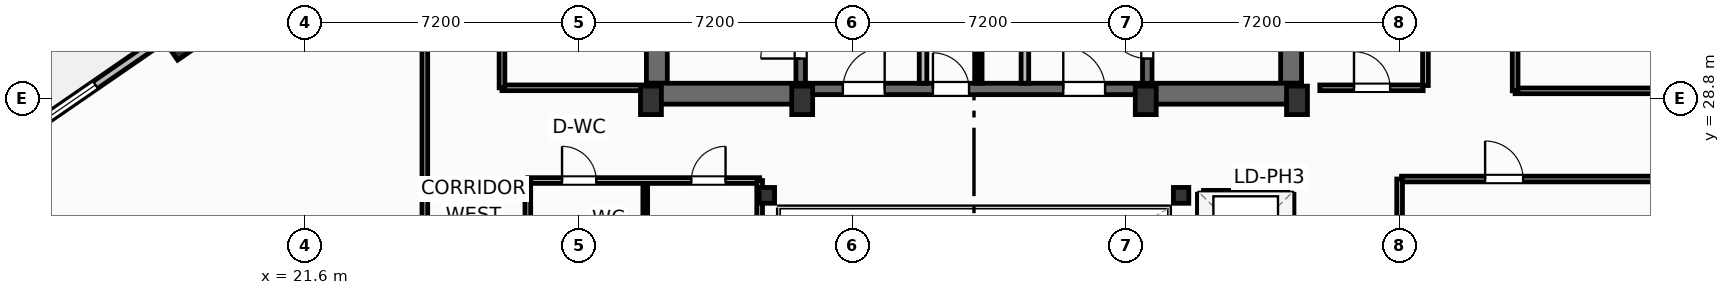
"""IFC4 building model, lengths in metres.
Left out: names, types, materials, properties, quantities, classifications, styles, units other than length and angle.
Written with IfcOpenShell. Run it as: python <this file> out.ifc"""

import sys

from ifc_helpers import new_model, si_unit, direction, frame, frame_2d, origin, origin_2d, place, context, subcontext, project, spatial, rectangle, i_section, extrude, element, fill, save


model = new_model("IFC4")
c1 = context("Model", 3, precision=1e-05, world=origin(), true_north=direction((0.0, 1.0)))
c2 = subcontext(c1, "Body", "Model", "MODEL_VIEW")
j1 = project(units=[si_unit("LENGTHUNIT", "METRE"), si_unit("PLANEANGLEUNIT", "RADIAN")], contexts=[c1])
p1 = place(None, origin())
s1 = spatial("IfcSite", under=j1, at=p1, CompositionType="ELEMENT")
p2 = place(p1, origin())
s2 = spatial("IfcBuilding", under=s1, at=p2, CompositionType="ELEMENT")
p3 = place(p2, frame((0.0, 0.0, 296.3)))
s3 = spatial("IfcBuildingStorey", under=s2, at=p3, CompositionType="ELEMENT", Elevation=296.3)
for number, where, z_axis, x_axis in (
    (1, (30.7, 28.75, 0.0), (0.0, 0.0, 1.0), (1.0, 0.0, 0.0)),
    (2, (34.68, 28.75, 0.0), (0.0, 0.0, 1.0), (1.0, 0.0, 0.0)),
    (3, (43.72, 28.75, 0.0), (0.0, 0.0, 1.0), (1.0, 0.0, 0.0)),
    (4, (47.7, 28.75, 0.0), (0.0, 0.0, 1.0), (1.0, 0.0, 0.0)),
):
    element("IfcColumn", number, at=place(p3, frame(where, z_axis=z_axis, x_axis=x_axis)), inside=s3, PredefinedType="COLUMN", context=c2, shape_type="SweptSolid", body=[
        extrude(rectangle(XDim=0.55, YDim=0.75, at=origin_2d()), origin(), (0.0, 0.0, 1.0), 4.8),
    ])
for number, where, z_axis, x_axis in (
    (5, (33.75, 26.25, 0.0), (0.0, 0.0, 1.0), (1.0, 0.0, 0.0)),
    (6, (44.65, 26.25, 0.0), (0.0, 0.0, 1.0), (1.0, 0.0, 0.0)),
):
    element("IfcColumn", number, at=place(p3, frame(where, z_axis=z_axis, x_axis=x_axis)), inside=s3, PredefinedType="COLUMN", context=c2, shape_type="SweptSolid", body=[
        extrude(i_section(OverallWidth=0.406, OverallDepth=0.416, WebThickness=0.03, FlangeThickness=0.048, FilletRadius=0.025, at=origin_2d()), origin(), (0.0, 0.0, 1.0), 4.8),
    ])
for number, where, z_axis, x_axis in (
    (7, (30.855, 29.2, 0.0), (0.0, 0.0, 1.0), (0.0, 1.0, 0.0)),
    (8, (47.545, 29.2, 0.0), (0.0, 0.0, 1.0), (0.0, 1.0, 0.0)),
):
    element("IfcWall", number, at=place(p3, frame(where, z_axis=z_axis, x_axis=x_axis)), inside=s3, PredefinedType="SHEAR", context=c2, shape_type="SweptSolid", body=[
        extrude(rectangle(XDim=9.22, YDim=0.55, at=frame_2d((4.61, 0.0))), origin(), (0.0, 0.0, 1.0), 4.55),
    ])
for number, where, z_axis, x_axis in (
    (9, (30.58, 28.925, 0.0), (0.0, 0.0, 1.0), (1.0, 0.0, 0.0)),
    (10, (43.6, 28.925, 0.0), (0.0, 0.0, 1.0), (1.0, 0.0, 0.0)),
):
    element("IfcWall", number, at=place(p3, frame(where, z_axis=z_axis, x_axis=x_axis)), inside=s3, PredefinedType="SHEAR", context=c2, shape_type="SweptSolid", body=[
        extrude(rectangle(XDim=4.22, YDim=0.55, at=frame_2d((2.11, 0.0))), origin(), (0.0, 0.0, 1.0), 4.55),
    ])
p4 = place(p3, frame((34.8, 29.05, 0.0), z_axis=(0.0, 0.0, 1.0), x_axis=(1.0, 0.0, 0.0)))
e11 = element("IfcWall", 11, at=p4, inside=s3, PredefinedType="SHEAR", context=c2, shape_type="SweptSolid", body=[
    extrude(rectangle(XDim=8.8, YDim=0.3, at=frame_2d((4.4, 0.0))), origin(), (0.0, 0.0, 1.0), 4.55),
])
p5 = place(p4, frame((0.95, 0.0, 0.0)))
e12 = element("IfcOpeningElement", 12, at=p5, cuts=e11, PredefinedType="OPENING", context=c2, shape_type="SweptSolid", body=[
    extrude(rectangle(XDim=1.1, YDim=2.15, at=frame_2d((0.55, 1.075))), frame((0.0, 0.16, 0.0), z_axis=(0.0, -1.0, 0.0), x_axis=(1.0, 0.0, 0.0)), (0.0, 0.0, 1.0), 0.32),
])
p6 = place(p4, frame((6.75, 0.0, 0.0)))
e13 = element("IfcOpeningElement", 13, at=p6, cuts=e11, PredefinedType="OPENING", context=c2, shape_type="SweptSolid", body=[
    extrude(rectangle(XDim=1.1, YDim=2.15, at=frame_2d((0.55, 1.075))), frame((0.0, 0.16, 0.0), z_axis=(0.0, -1.0, 0.0), x_axis=(1.0, 0.0, 0.0)), (0.0, 0.0, 1.0), 0.32),
])
p7 = place(p4, frame((3.32, 0.0, 0.0)))
e14 = element("IfcOpeningElement", 14, at=p7, cuts=e11, PredefinedType="OPENING", context=c2, shape_type="SweptSolid", body=[
    extrude(rectangle(XDim=0.95, YDim=2.15, at=frame_2d((0.475, 1.075))), frame((0.0, 0.16, 0.0), z_axis=(0.0, -1.0, 0.0), x_axis=(1.0, 0.0, 0.0)), (0.0, 0.0, 1.0), 0.32),
])
p8 = place(p3, frame((34.64, 29.2, 0.0), z_axis=(0.0, 0.0, 1.0), x_axis=(0.0, 1.0, 0.0)))
e15 = element("IfcWall", 15, at=p8, inside=s3, PredefinedType="SHEAR", context=c2, shape_type="SweptSolid", body=[
    extrude(rectangle(XDim=9.22, YDim=0.25, at=frame_2d((4.61, 0.0))), origin(), (0.0, 0.0, 1.0), 4.55),
])
p9 = place(p8, frame((0.65, 0.0, 0.0)))
e16 = element("IfcOpeningElement", 16, at=p9, cuts=e15, PredefinedType="OPENING", context=c2, shape_type="SweptSolid", body=[
    extrude(rectangle(XDim=1.05, YDim=2.15, at=frame_2d((0.525, 1.075))), frame((0.0, 0.135, 0.0), z_axis=(0.0, -1.0, 0.0), x_axis=(1.0, 0.0, 0.0)), (0.0, 0.0, 1.0), 0.27),
])
p10 = place(p3, frame((43.76, 29.2, 0.0), z_axis=(0.0, 0.0, 1.0), x_axis=(0.0, 1.0, 0.0)))
e17 = element("IfcWall", 17, at=p10, inside=s3, PredefinedType="SHEAR", context=c2, shape_type="SweptSolid", body=[
    extrude(rectangle(XDim=9.22, YDim=0.25, at=frame_2d((4.61, 0.0))), origin(), (0.0, 0.0, 1.0), 4.55),
])
p11 = place(p10, frame((0.65, 0.0, 0.0)))
e18 = element("IfcOpeningElement", 18, at=p11, cuts=e17, PredefinedType="OPENING", context=c2, shape_type="SweptSolid", body=[
    extrude(rectangle(XDim=1.05, YDim=2.15, at=frame_2d((0.525, 1.075))), frame((0.0, 0.135, 0.0), z_axis=(0.0, -1.0, 0.0), x_axis=(1.0, 0.0, 0.0)), (0.0, 0.0, 1.0), 0.27),
])
p12 = place(p3, frame((18.296, 30.086, -0.32), z_axis=(0.0, 0.0, 1.0), x_axis=(0.823532597628, 0.567268949127, 0.0)))
e19 = element("IfcColumn", 19, at=p12, inside=s3, PredefinedType="COLUMN", context=c2, shape_type="SweptSolid", body=[
    extrude(i_section(OverallWidth=0.401, OverallDepth=0.399, WebThickness=0.025, FlangeThickness=0.04, FilletRadius=0.022, at=origin_2d()), origin(), (0.0, 0.0, 1.0), 5.12),
])
p13 = place(p3, frame((13.489, 27.37, 0.0), z_axis=(0.0, 0.0, 1.0), x_axis=(0.823532439547, 0.567269178622, 0.0)))
e20 = element("IfcWall", 20, at=p13, inside=s3, PredefinedType="SOLIDWALL", context=c2, shape_type="SweptSolid", body=[
    extrude(rectangle(XDim=40.0, YDim=0.22, at=frame_2d((20.0, 0.0))), origin(), (0.0, 0.0, 1.0), 3.83),
])
p14 = place(p13, frame((25.598, 0.0, 0.0)))
e21 = element("IfcOpeningElement", 21, at=p14, cuts=e20, PredefinedType="OPENING", context=c2, shape_type="SweptSolid", body=[
    extrude(rectangle(XDim=1.95, YDim=2.35, at=frame_2d((0.975, 1.175))), frame((0.0, 0.12, 0.0), z_axis=(0.0, -1.0, 0.0), x_axis=(1.0, 0.0, 0.0)), (0.0, 0.0, 1.0), 0.24),
])
p15 = place(p13, frame((0.55, 0.0, 0.75)))
e22 = element("IfcOpeningElement", 22, at=p15, cuts=e20, PredefinedType="OPENING", context=c2, shape_type="SweptSolid", body=[
    extrude(rectangle(XDim=2.6, YDim=2.0, at=frame_2d((1.3, 1.0))), frame((0.0, 0.12, 0.0), z_axis=(0.0, -1.0, 0.0), x_axis=(1.0, 0.0, 0.0)), (0.0, 0.0, 1.0), 0.24),
])
p16 = place(p13, frame((36.85, 0.0, 0.75)))
e23 = element("IfcOpeningElement", 23, at=p16, cuts=e20, PredefinedType="OPENING", context=c2, shape_type="SweptSolid", body=[
    extrude(rectangle(XDim=2.6, YDim=2.0, at=frame_2d((1.3, 1.0))), frame((0.0, 0.12, 0.0), z_axis=(0.0, -1.0, 0.0), x_axis=(1.0, 0.0, 0.0)), (0.0, 0.0, 1.0), 0.24),
])
p17 = place(p3, frame((27.46, 26.64, 0.0), z_axis=(0.0, 0.0, 1.0), x_axis=(1.0, 0.0, 0.0)))
e24 = element("IfcWall", 24, at=p17, inside=s3, PredefinedType="PARTITIONING", context=c2, shape_type="SweptSolid", body=[
    extrude(rectangle(XDim=6.1, YDim=0.15, at=frame_2d((3.05, 0.0))), origin(), (0.0, 0.0, 1.0), 4.55),
])
p18 = place(p17, frame((0.9, 0.0, 0.0)))
e25 = element("IfcOpeningElement", 25, at=p18, cuts=e24, PredefinedType="OPENING", context=c2, shape_type="SweptSolid", body=[
    extrude(rectangle(XDim=0.9, YDim=2.05, at=frame_2d((0.45, 1.025))), frame((0.0, 0.085, 0.0), z_axis=(0.0, -1.0, 0.0), x_axis=(1.0, 0.0, 0.0)), (0.0, 0.0, 1.0), 0.17),
])
p19 = place(p17, frame((4.303, 0.0, 0.0)))
e26 = element("IfcOpeningElement", 26, at=p19, cuts=e24, PredefinedType="OPENING", context=c2, shape_type="SweptSolid", body=[
    extrude(rectangle(XDim=0.9, YDim=2.05, at=frame_2d((0.45, 1.025))), frame((0.0, 0.085, 0.0), z_axis=(0.0, -1.0, 0.0), x_axis=(1.0, 0.0, 0.0)), (0.0, 0.0, 1.0), 0.17),
])
p20 = place(p3, frame((30.55, 19.38, 0.0), z_axis=(0.0, 0.0, 1.0), x_axis=(0.0, 1.0, 0.0)))
e27 = element("IfcWall", 27, at=p20, inside=s3, PredefinedType="PARTITIONING", context=c2, shape_type="SweptSolid", body=[
    extrude(rectangle(XDim=7.18, YDim=0.125, at=frame_2d((3.59, 0.0))), origin(), (0.0, 0.0, 1.0), 4.55),
])
p21 = place(p3, frame((27.46, 19.3, 0.0), z_axis=(0.0, 0.0, 1.0), x_axis=(0.0, 1.0, 0.0)))
e28 = element("IfcWall", 28, at=p21, inside=s3, PredefinedType="PARTITIONING", context=c2, shape_type="SweptSolid", body=[
    extrude(rectangle(XDim=7.34, YDim=0.15, at=frame_2d((3.67, 0.0))), origin(), (0.0, 0.0, 1.0), 4.55),
])
p22 = place(p3, frame((33.56, 19.3, 0.0), z_axis=(0.0, 0.0, 1.0), x_axis=(0.0, 1.0, 0.0)))
e29 = element("IfcWall", 29, at=p22, inside=s3, PredefinedType="PARTITIONING", context=c2, shape_type="SweptSolid", body=[
    extrude(rectangle(XDim=7.34, YDim=0.15, at=frame_2d((3.67, 0.0))), origin(), (0.0, 0.0, 1.0), 3.924),
])
p23 = place(p3, frame((24.75, 16.85, 0.0), z_axis=(0.0, 0.0, 1.0), x_axis=(0.0, 1.0, 0.0)))
e30 = element("IfcWall", 30, at=p23, inside=s3, PredefinedType="PARTITIONING", context=c2, shape_type="SweptSolid", body=[
    extrude(rectangle(XDim=18.241, YDim=0.15, at=frame_2d((9.12, 0.0))), origin(), (0.0, 0.0, 1.0), 4.55),
])
p24 = place(p23, frame((5.2, 0.0, 0.0)))
e31 = element("IfcOpeningElement", 31, at=p24, cuts=e30, PredefinedType="OPENING", context=c2, shape_type="SweptSolid", body=[
    extrude(rectangle(XDim=1.0, YDim=2.05, at=frame_2d((0.5, 1.025))), frame((0.0, 0.085, 0.0), z_axis=(0.0, -1.0, 0.0), x_axis=(1.0, 0.0, 0.0)), (0.0, 0.0, 1.0), 0.17),
])
p25 = place(p3, frame((53.44, 29.0, 0.0), z_axis=(0.0, 0.0, 1.0), x_axis=(1.0, 0.0, 0.0)))
e32 = element("IfcWall", 32, at=p25, inside=s3, PredefinedType="PARTITIONING", context=c2, shape_type="SweptSolid", body=[
    extrude(rectangle(XDim=12.56, YDim=0.15, at=frame_2d((6.28, 0.0))), origin(), (0.0, 0.0, 1.0), 4.55),
])
p26 = place(p3, frame((53.44, 29.0, 0.0), z_axis=(0.0, 0.0, 1.0), x_axis=(0.0, 1.0, 0.0)))
e33 = element("IfcWall", 33, at=p26, inside=s3, PredefinedType="PARTITIONING", context=c2, shape_type="SweptSolid", body=[
    extrude(rectangle(XDim=10.32, YDim=0.15, at=frame_2d((5.16, 0.0))), origin(), (0.0, 0.0, 1.0), 4.55),
])
p27 = place(p26, frame((3.5, 0.0, 0.0)))
e34 = element("IfcOpeningElement", 34, at=p27, cuts=e33, PredefinedType="OPENING", context=c2, shape_type="SweptSolid", body=[
    extrude(rectangle(XDim=2.0, YDim=2.05, at=frame_2d((1.0, 1.025))), frame((0.0, 0.085, 0.0), z_axis=(0.0, -1.0, 0.0), x_axis=(1.0, 0.0, 0.0)), (0.0, 0.0, 1.0), 0.17),
])
p28 = place(p3, frame((50.45, 26.68, 0.0), z_axis=(0.0, 0.0, 1.0), x_axis=(1.0, 0.0, 0.0)))
e35 = element("IfcWall", 35, at=p28, inside=s3, PredefinedType="PARTITIONING", context=c2, shape_type="SweptSolid", body=[
    extrude(rectangle(XDim=15.55, YDim=0.15, at=frame_2d((7.775, 0.0))), origin(), (0.0, 0.0, 1.0), 4.55),
])
p29 = place(p28, frame((2.2, 0.0, 0.0)))
e36 = element("IfcOpeningElement", 36, at=p29, cuts=e35, PredefinedType="OPENING", context=c2, shape_type="SweptSolid", body=[
    extrude(rectangle(XDim=1.0, YDim=2.05, at=frame_2d((0.5, 1.025))), frame((0.0, 0.085, 0.0), z_axis=(0.0, -1.0, 0.0), x_axis=(1.0, 0.0, 0.0)), (0.0, 0.0, 1.0), 0.17),
])
p30 = place(p3, frame((50.4, 19.3, 0.0), z_axis=(0.0, 0.0, 1.0), x_axis=(0.0, 1.0, 0.0)))
e37 = element("IfcWall", 37, at=p30, inside=s3, PredefinedType="PARTITIONING", context=c2, shape_type="SweptSolid", body=[
    extrude(rectangle(XDim=7.38, YDim=0.15, at=frame_2d((3.69, 0.0))), origin(), (0.0, 0.0, 1.0), 4.55),
])
for number, where, z_axis, x_axis in (
    (38, (37.86, 29.2, 0.0), (0.0, 0.0, 1.0), (0.0, 1.0, 0.0)),
    (39, (40.54, 29.2, 0.0), (0.0, 0.0, 1.0), (0.0, 1.0, 0.0)),
):
    element("IfcWall", number, at=place(p3, frame(where, z_axis=z_axis, x_axis=x_axis)), inside=s3, PredefinedType="PARTITIONING", context=c2, shape_type="SweptSolid", body=[
        extrude(rectangle(XDim=5.18, YDim=0.2, at=frame_2d((2.59, 0.0))), origin(), (0.0, 0.0, 1.0), 4.55),
    ])
p31 = place(p3, frame((39.35, 29.2, 0.0), z_axis=(0.0, 0.0, 1.0), x_axis=(0.0, 1.0, 0.0)))
e40 = element("IfcWall", 40, at=p31, inside=s3, PredefinedType="PARTITIONING", context=c2, shape_type="SweptSolid", body=[
    extrude(rectangle(XDim=5.22, YDim=0.125, at=frame_2d((2.61, 0.0))), origin(), (0.0, 0.0, 1.0), 4.55),
])
p32 = place(p31, frame((2.05, 0.0, 0.0)))
e41 = element("IfcOpeningElement", 41, at=p32, cuts=e40, PredefinedType="OPENING", context=c2, shape_type="SweptSolid", body=[
    extrude(rectangle(XDim=0.85, YDim=2.05, at=frame_2d((0.425, 1.025))), frame((0.0, 0.073, 0.0), z_axis=(0.0, -1.0, 0.0), x_axis=(1.0, 0.0, 0.0)), (0.0, 0.0, 1.0), 0.145),
])
p33 = place(p3, frame((26.78, 29.08, 0.0), z_axis=(0.0, 0.0, 1.0), x_axis=(1.0, 0.0, 0.0)))
e42 = element("IfcWall", 42, at=p33, inside=s3, PredefinedType="PARTITIONING", context=c2, shape_type="SweptSolid", body=[
    extrude(rectangle(XDim=3.8, YDim=0.15, at=frame_2d((1.9, 0.0))), origin(), (0.0, 0.0, 1.0), 3.839),
])
p34 = place(p3, frame((26.78, 29.08, 0.0), z_axis=(0.0, 0.0, 1.0), x_axis=(0.0, 1.0, 0.0)))
e43 = element("IfcWall", 43, at=p34, inside=s3, PredefinedType="PARTITIONING", context=c2, shape_type="SweptSolid", body=[
    extrude(rectangle(XDim=9.18, YDim=0.15, at=frame_2d((4.59, 0.0))), origin(), (0.0, 0.0, 1.0), 4.55),
])
p35 = place(p34, frame((2.4, 0.0, 0.0)))
e44 = element("IfcOpeningElement", 44, at=p35, cuts=e43, PredefinedType="OPENING", context=c2, shape_type="SweptSolid", body=[
    extrude(rectangle(XDim=0.95, YDim=2.05, at=frame_2d((0.475, 1.025))), frame((0.0, 0.085, 0.0), z_axis=(0.0, -1.0, 0.0), x_axis=(1.0, 0.0, 0.0)), (0.0, 0.0, 1.0), 0.17),
])
p36 = place(p3, frame((48.3, 29.08, 0.0), z_axis=(0.0, 0.0, 1.0), x_axis=(1.0, 0.0, 0.0)))
e45 = element("IfcWall", 45, at=p36, inside=s3, PredefinedType="PARTITIONING", context=c2, shape_type="SweptSolid", body=[
    extrude(rectangle(XDim=2.72, YDim=0.15, at=frame_2d((1.36, 0.0))), origin(), (0.0, 0.0, 1.0), 4.55),
])
p37 = place(p36, frame((0.9, 0.0, 0.0)))
e46 = element("IfcOpeningElement", 46, at=p37, cuts=e45, PredefinedType="OPENING", context=c2, shape_type="SweptSolid", body=[
    extrude(rectangle(XDim=0.95, YDim=2.05, at=frame_2d((0.475, 1.025))), frame((0.0, 0.085, 0.0), z_axis=(0.0, -1.0, 0.0), x_axis=(1.0, 0.0, 0.0)), (0.0, 0.0, 1.0), 0.17),
])
p38 = place(p3, frame((51.08, 29.14, 0.0), z_axis=(0.0, 0.0, 1.0), x_axis=(0.0, 1.0, 0.0)))
e47 = element("IfcWall", 47, at=p38, inside=s3, PredefinedType="PARTITIONING", context=c2, shape_type="SweptSolid", body=[
    extrude(rectangle(XDim=6.76, YDim=0.15, at=frame_2d((3.38, 0.0))), origin(), (0.0, 0.0, 1.0), 4.55),
])
p39 = place(p3, frame((45.24, 26.28, 0.0), z_axis=(0.0, 0.0, 1.0), x_axis=(1.0, 0.0, 0.0)))
e48 = element("IfcWall", 48, at=p39, inside=s3, PredefinedType="PARTITIONING", context=c2, shape_type="SweptSolid", body=[
    extrude(rectangle(XDim=2.22, YDim=0.2, at=frame_2d((1.11, 0.0))), origin(), (0.0, 0.0, 1.0), 4.55),
])
p40 = place(p3, frame((45.18, 19.38, 0.0), z_axis=(0.0, 0.0, 1.0), x_axis=(0.0, 1.0, 0.0)))
e49 = element("IfcWall", 49, at=p40, inside=s3, PredefinedType="PARTITIONING", context=c2, shape_type="SweptSolid", body=[
    extrude(rectangle(XDim=6.9, YDim=0.2, at=frame_2d((3.45, 0.0))), origin(), (0.0, 0.0, 1.0), 4.55),
])
p41 = place(p3, frame((47.52, 19.38, 0.0), z_axis=(0.0, 0.0, 1.0), x_axis=(0.0, 1.0, 0.0)))
e50 = element("IfcWall", 50, at=p41, inside=s3, PredefinedType="PARTITIONING", context=c2, shape_type="SweptSolid", body=[
    extrude(rectangle(XDim=6.9, YDim=0.2, at=frame_2d((3.45, 0.0))), origin(), (0.0, 0.0, 1.0), 4.55),
])
p42 = place(p41, frame((0.59, 0.0, 0.0)))
e51 = element("IfcOpeningElement", 51, at=p42, cuts=e50, PredefinedType="OPENING", context=c2, shape_type="SweptSolid", body=[
    extrude(rectangle(XDim=1.1, YDim=2.15, at=frame_2d((0.55, 1.075))), frame((0.0, 0.11, 0.0), z_axis=(0.0, -1.0, 0.0), x_axis=(1.0, 0.0, 0.0)), (0.0, 0.0, 1.0), 0.22),
])
p43 = place(p41, frame((2.89, 0.0, 0.0)))
e52 = element("IfcOpeningElement", 52, at=p43, cuts=e50, PredefinedType="OPENING", context=c2, shape_type="SweptSolid", body=[
    extrude(rectangle(XDim=1.1, YDim=2.15, at=frame_2d((0.55, 1.075))), frame((0.0, 0.11, 0.0), z_axis=(0.0, -1.0, 0.0), x_axis=(1.0, 0.0, 0.0)), (0.0, 0.0, 1.0), 0.22),
])
p44 = place(p41, frame((5.19, 0.0, 0.0)))
e53 = element("IfcOpeningElement", 53, at=p44, cuts=e50, PredefinedType="OPENING", context=c2, shape_type="SweptSolid", body=[
    extrude(rectangle(XDim=1.1, YDim=2.15, at=frame_2d((0.55, 1.075))), frame((0.0, 0.11, 0.0), z_axis=(0.0, -1.0, 0.0), x_axis=(1.0, 0.0, 0.0)), (0.0, 0.0, 1.0), 0.22),
])
p45 = place(p15, origin())
e54 = element("IfcWindow", 54, at=p45, inside=s3, PartitioningType="SINGLE_PANEL", PredefinedType="WINDOW", context=c2, shape_type="SweptSolid", body=[
    extrude(rectangle(XDim=2.6, YDim=2.0, at=frame_2d((1.3, 1.0))), frame((0.0, 0.03, 0.0), z_axis=(0.0, -1.0, 0.0), x_axis=(1.0, 0.0, 0.0)), (0.0, 0.0, 1.0), 0.06),
])
fill(e22, e54)
p46 = place(p18, origin())
e55 = element("IfcDoor", 55, at=p46, inside=s3, OperationType="SINGLE_SWING_LEFT", PredefinedType="DOOR", context=c2, shape_type="SweptSolid", body=[
    extrude(rectangle(XDim=0.9, YDim=2.05, at=frame_2d((0.45, 1.025))), frame((0.0, 0.025, 0.0), z_axis=(0.0, -1.0, 0.0), x_axis=(1.0, 0.0, 0.0)), (0.0, 0.0, 1.0), 0.05),
])
fill(e25, e55)
p47 = place(p19, origin())
e56 = element("IfcDoor", 56, at=p47, inside=s3, OperationType="SINGLE_SWING_RIGHT", PredefinedType="DOOR", context=c2, shape_type="SweptSolid", body=[
    extrude(rectangle(XDim=0.9, YDim=2.05, at=frame_2d((0.45, 1.025))), frame((0.0, 0.025, 0.0), z_axis=(0.0, -1.0, 0.0), x_axis=(1.0, 0.0, 0.0)), (0.0, 0.0, 1.0), 0.05),
])
fill(e26, e56)
p48 = place(p29, origin())
e57 = element("IfcDoor", 57, at=p48, inside=s3, OperationType="SINGLE_SWING_LEFT", PredefinedType="DOOR", context=c2, shape_type="SweptSolid", body=[
    extrude(rectangle(XDim=1.0, YDim=2.05, at=frame_2d((0.5, 1.025))), frame((0.0, 0.025, 0.0), z_axis=(0.0, -1.0, 0.0), x_axis=(1.0, 0.0, 0.0)), (0.0, 0.0, 1.0), 0.05),
])
fill(e36, e57)
p49 = place(p9, origin())
e58 = element("IfcDoor", 58, at=p49, inside=s3, OperationType="SINGLE_SWING_LEFT", PredefinedType="DOOR", context=c2, shape_type="SweptSolid", body=[
    extrude(rectangle(XDim=1.05, YDim=2.15, at=frame_2d((0.525, 1.075))), frame((0.0, 0.025, 0.0), z_axis=(0.0, -1.0, 0.0), x_axis=(1.0, 0.0, 0.0)), (0.0, 0.0, 1.0), 0.05),
])
fill(e16, e58)
p50 = place(p11, origin())
e59 = element("IfcDoor", 59, at=p50, inside=s3, OperationType="SINGLE_SWING_RIGHT", PredefinedType="DOOR", context=c2, shape_type="SweptSolid", body=[
    extrude(rectangle(XDim=1.05, YDim=2.15, at=frame_2d((0.525, 1.075))), frame((0.0, 0.025, 0.0), z_axis=(0.0, -1.0, 0.0), x_axis=(1.0, 0.0, 0.0)), (0.0, 0.0, 1.0), 0.05),
])
fill(e18, e59)
p51 = place(p5, origin())
e60 = element("IfcDoor", 60, at=p51, inside=s3, OperationType="SINGLE_SWING_RIGHT", PredefinedType="DOOR", context=c2, shape_type="SweptSolid", body=[
    extrude(rectangle(XDim=1.1, YDim=2.15, at=frame_2d((0.55, 1.075))), frame((0.0, 0.025, 0.0), z_axis=(0.0, -1.0, 0.0), x_axis=(1.0, 0.0, 0.0)), (0.0, 0.0, 1.0), 0.05),
])
fill(e12, e60)
p52 = place(p6, origin())
e61 = element("IfcDoor", 61, at=p52, inside=s3, OperationType="SINGLE_SWING_LEFT", PredefinedType="DOOR", context=c2, shape_type="SweptSolid", body=[
    extrude(rectangle(XDim=1.1, YDim=2.15, at=frame_2d((0.55, 1.075))), frame((0.0, 0.025, 0.0), z_axis=(0.0, -1.0, 0.0), x_axis=(1.0, 0.0, 0.0)), (0.0, 0.0, 1.0), 0.05),
])
fill(e13, e61)
p53 = place(p7, origin())
e62 = element("IfcDoor", 62, at=p53, inside=s3, OperationType="SINGLE_SWING_LEFT", PredefinedType="DOOR", context=c2, shape_type="SweptSolid", body=[
    extrude(rectangle(XDim=0.95, YDim=2.15, at=frame_2d((0.475, 1.075))), frame((0.0, 0.025, 0.0), z_axis=(0.0, -1.0, 0.0), x_axis=(1.0, 0.0, 0.0)), (0.0, 0.0, 1.0), 0.05),
])
fill(e14, e62)
p54 = place(p37, origin())
e63 = element("IfcDoor", 63, at=p54, inside=s3, OperationType="SINGLE_SWING_LEFT", PredefinedType="DOOR", context=c2, shape_type="SweptSolid", body=[
    extrude(rectangle(XDim=0.95, YDim=2.05, at=frame_2d((0.475, 1.025))), frame((0.0, 0.025, 0.0), z_axis=(0.0, -1.0, 0.0), x_axis=(1.0, 0.0, 0.0)), (0.0, 0.0, 1.0), 0.05),
])
fill(e46, e63)
save(model, sys.argv[1])
